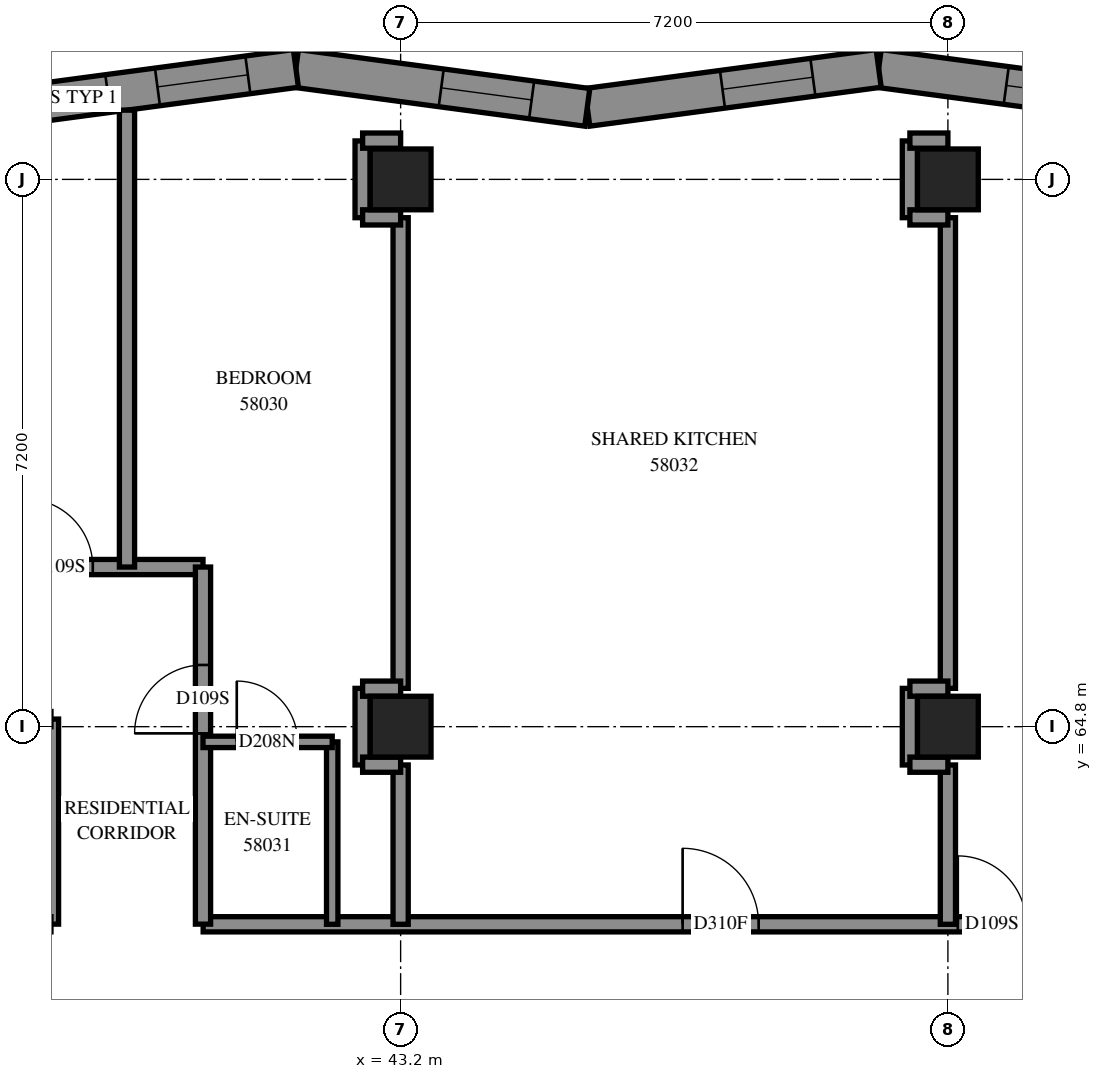
"""IFC4 building model, lengths in metres.
Left out: names, types, materials, properties, quantities, classifications, styles, units other than length and angle.
Written with IfcOpenShell. Run it as: python <this file> out.ifc"""

import sys

from ifc_helpers import new_model, si_unit, direction, frame, frame_2d, origin, origin_2d, place, context, subcontext, project, spatial, polyline, rectangle, outline, extrude, element, fill, save


model = new_model("IFC4")
c1 = context("Model", 3, precision=1e-05, world=origin(), true_north=direction((0.0, 1.0)))
c2 = subcontext(c1, "Body", "Model", "MODEL_VIEW")
j1 = project(units=[si_unit("LENGTHUNIT", "METRE"), si_unit("PLANEANGLEUNIT", "RADIAN")], contexts=[c1])
p1 = place(None, origin())
s1 = spatial("IfcSite", under=j1, at=p1, CompositionType="ELEMENT")
p2 = place(p1, origin())
s2 = spatial("IfcBuilding", under=s1, at=p2, CompositionType="ELEMENT")
p3 = place(p2, frame((0.0, 0.0, 213.4)))
s3 = spatial("IfcBuildingStorey", under=s2, at=p3, CompositionType="ELEMENT", Elevation=213.4)
for number, where, z_axis, x_axis in (
    (1, (43.2, 64.8, 0.0), (0.0, 0.0, 1.0), (1.0, 0.0, 0.0)),
    (2, (43.2, 72.0, 0.0), (0.0, 0.0, 1.0), (1.0, 0.0, 0.0)),
    (3, (50.4, 64.8, 0.0), (0.0, 0.0, 1.0), (1.0, 0.0, 0.0)),
    (4, (50.4, 72.0, 0.0), (0.0, 0.0, 1.0), (1.0, 0.0, 0.0)),
):
    element("IfcColumn", number, at=place(p3, frame(where, z_axis=z_axis, x_axis=x_axis)), inside=s3, PredefinedType="COLUMN", context=c2, shape_type="SweptSolid", body=[
        extrude(rectangle(XDim=0.8, YDim=0.8, at=origin_2d()), origin(), (0.0, 0.0, 1.0), 3.1),
    ])
p4 = place(p3, frame((53.323, 72.948, 0.0), z_axis=(0.0, 0.0, 1.0), x_axis=(-0.9911989729, 0.1323804972, 0.0)))
e5 = element("IfcWall", 5, at=p4, inside=s3, PredefinedType="SOLIDWALL", context=c2, shape_type="SweptSolid", body=[
    extrude(outline(polyline([(0.033, -0.25), (3.901, -0.25), (3.834, 0.25), (-0.033, 0.25), (0.033, -0.25)])), origin(), (0.0, 0.0, 1.0), 3.1),
])
p5 = place(p4, frame((0.974, 0.0, 0.45)))
e6 = element("IfcOpeningElement", 6, at=p5, cuts=e5, PredefinedType="OPENING", context=c2, shape_type="SweptSolid", body=[
    extrude(rectangle(XDim=1.2, YDim=2.5, at=frame_2d((0.6, 1.25))), frame((0.0, 0.26, 0.0), z_axis=(0.0, -1.0, 0.0), x_axis=(1.0, 0.0, 0.0)), (0.0, 0.0, 1.0), 0.52),
])
p6 = place(p3, frame((49.489, 73.46, 0.0), z_axis=(0.0, 0.0, 1.0), x_axis=(-0.9911985198, -0.13238389, 0.0)))
e7 = element("IfcWall", 7, at=p6, inside=s3, PredefinedType="SOLIDWALL", context=c2, shape_type="SweptSolid", body=[
    extrude(outline(polyline([(-0.033, -0.25), (3.834, -0.25), (3.901, 0.25), (0.033, 0.25), (-0.033, -0.25)])), origin(), (0.0, 0.0, 1.0), 3.1),
])
p7 = place(p6, frame((0.873, 0.0, 0.45)))
e8 = element("IfcOpeningElement", 8, at=p7, cuts=e7, PredefinedType="OPENING", context=c2, shape_type="SweptSolid", body=[
    extrude(rectangle(XDim=1.2, YDim=2.5, at=frame_2d((0.6, 1.25))), frame((0.0, 0.26, 0.0), z_axis=(0.0, -1.0, 0.0), x_axis=(1.0, 0.0, 0.0)), (0.0, 0.0, 1.0), 0.52),
])
p8 = place(p3, frame((45.656, 72.948, 0.0), z_axis=(0.0, 0.0, 1.0), x_axis=(-0.9911989729, 0.1323804972, 0.0)))
e9 = element("IfcWall", 9, at=p8, inside=s3, PredefinedType="SOLIDWALL", context=c2, shape_type="SweptSolid", body=[
    extrude(outline(polyline([(0.033, -0.25), (3.901, -0.25), (3.834, 0.25), (-0.033, 0.25), (0.033, -0.25)])), origin(), (0.0, 0.0, 1.0), 3.1),
])
p9 = place(p8, frame((0.739, 0.0, 0.45)))
e10 = element("IfcOpeningElement", 10, at=p9, cuts=e9, PredefinedType="OPENING", context=c2, shape_type="SweptSolid", body=[
    extrude(rectangle(XDim=1.2, YDim=2.5, at=frame_2d((0.6, 1.25))), frame((0.0, 0.26, 0.0), z_axis=(0.0, -1.0, 0.0), x_axis=(1.0, 0.0, 0.0)), (0.0, 0.0, 1.0), 0.52),
])
p10 = place(p3, frame((41.822, 73.46, 0.0), z_axis=(0.0, 0.0, 1.0), x_axis=(-0.9911985198, -0.13238389, 0.0)))
e11 = element("IfcWall", 11, at=p10, inside=s3, PredefinedType="SOLIDWALL", context=c2, shape_type="SweptSolid", body=[
    extrude(outline(polyline([(-0.033, -0.25), (3.834, -0.25), (3.901, 0.25), (0.033, 0.25), (-0.033, -0.25)])), origin(), (0.0, 0.0, 1.0), 3.1),
])
p11 = place(p10, frame((0.638, 0.0, 0.45)))
e12 = element("IfcOpeningElement", 12, at=p11, cuts=e11, PredefinedType="OPENING", context=c2, shape_type="SweptSolid", body=[
    extrude(rectangle(XDim=1.2, YDim=2.5, at=frame_2d((0.6, 1.25))), frame((0.0, 0.26, 0.0), z_axis=(0.0, -1.0, 0.0), x_axis=(1.0, 0.0, 0.0)), (0.0, 0.0, 1.0), 0.52),
])
p12 = place(p10, frame((2.496, 0.0, 0.45)))
e13 = element("IfcOpeningElement", 13, at=p12, cuts=e11, PredefinedType="OPENING", context=c2, shape_type="SweptSolid", body=[
    extrude(rectangle(XDim=1.0, YDim=2.5, at=frame_2d((0.5, 1.25))), frame((0.0, 0.26, 0.0), z_axis=(0.0, -1.0, 0.0), x_axis=(1.0, 0.0, 0.0)), (0.0, 0.0, 1.0), 0.52),
])
p13 = place(p3, frame((40.602, 62.2, 0.0), z_axis=(0.0, 0.0, 1.0), x_axis=(1.0, 0.0, 0.0)))
e14 = element("IfcWall", 14, at=p13, inside=s3, PredefinedType="PARTITIONING", context=c2, shape_type="SweptSolid", body=[
    extrude(rectangle(XDim=14.998, YDim=0.2, at=frame_2d((7.499, 0.0))), origin(), (0.0, 0.0, 1.0), 3.1),
])
p14 = place(p13, frame((6.308, 0.0, 0.0)))
e15 = element("IfcOpeningElement", 15, at=p14, cuts=e14, PredefinedType="OPENING", context=c2, shape_type="SweptSolid", body=[
    extrude(rectangle(XDim=1.0, YDim=2.1, at=frame_2d((0.5, 1.05))), frame((0.0, 0.11, 0.0), z_axis=(0.0, -1.0, 0.0), x_axis=(1.0, 0.0, 0.0)), (0.0, 0.0, 1.0), 0.22),
])
p15 = place(p13, frame((9.928, 0.0, 0.0)))
e16 = element("IfcOpeningElement", 16, at=p15, cuts=e14, PredefinedType="OPENING", context=c2, shape_type="SweptSolid", body=[
    extrude(rectangle(XDim=0.9, YDim=2.1, at=frame_2d((0.45, 1.05))), frame((0.0, 0.11, 0.0), z_axis=(0.0, -1.0, 0.0), x_axis=(1.0, 0.0, 0.0)), (0.0, 0.0, 1.0), 0.22),
])
p16 = place(p13, frame((13.746, 0.0, 0.0)))
e17 = element("IfcOpeningElement", 17, at=p16, cuts=e14, PredefinedType="OPENING", context=c2, shape_type="SweptSolid", body=[
    extrude(rectangle(XDim=1.0, YDim=2.1, at=frame_2d((0.5, 1.05))), frame((0.0, 0.11, 0.0), z_axis=(0.0, -1.0, 0.0), x_axis=(1.0, 0.0, 0.0)), (0.0, 0.0, 1.0), 0.22),
])
p17 = place(p3, frame((28.802, 66.9, 0.0), z_axis=(0.0, 0.0, 1.0), x_axis=(1.0, 0.0, 0.0)))
e18 = element("IfcWall", 18, at=p17, inside=s3, PredefinedType="PARTITIONING", context=c2, shape_type="SweptSolid", body=[
    extrude(rectangle(XDim=11.798, YDim=0.2, at=frame_2d((5.899, 0.0))), origin(), (0.0, 0.0, 1.0), 3.1),
])
p18 = place(p17, frame((1.805, 0.0, 0.0)))
e19 = element("IfcOpeningElement", 19, at=p18, cuts=e18, PredefinedType="OPENING", context=c2, shape_type="SweptSolid", body=[
    extrude(rectangle(XDim=1.0, YDim=2.1, at=frame_2d((0.5, 1.05))), frame((0.0, 0.11, 0.0), z_axis=(0.0, -1.0, 0.0), x_axis=(1.0, 0.0, 0.0)), (0.0, 0.0, 1.0), 0.22),
])
p19 = place(p17, frame((3.998, 0.0, 0.0)))
e20 = element("IfcOpeningElement", 20, at=p19, cuts=e18, PredefinedType="OPENING", context=c2, shape_type="SweptSolid", body=[
    extrude(rectangle(XDim=0.9, YDim=2.1, at=frame_2d((0.45, 1.05))), frame((0.0, 0.11, 0.0), z_axis=(0.0, -1.0, 0.0), x_axis=(1.0, 0.0, 0.0)), (0.0, 0.0, 1.0), 0.22),
])
p20 = place(p17, frame((9.448, 0.0, 0.0)))
e21 = element("IfcOpeningElement", 21, at=p20, cuts=e18, PredefinedType="OPENING", context=c2, shape_type="SweptSolid", body=[
    extrude(rectangle(XDim=0.9, YDim=2.1, at=frame_2d((0.45, 1.05))), frame((0.0, 0.11, 0.0), z_axis=(0.0, -1.0, 0.0), x_axis=(1.0, 0.0, 0.0)), (0.0, 0.0, 1.0), 0.22),
])
for number, where, z_axis, x_axis in (
    (22, (43.2, 65.304, 0.0), (0.0, 0.0, 1.0), (0.0, 1.0, 0.0)),
    (23, (50.4, 65.304, 0.0), (0.0, 0.0, 1.0), (0.0, 1.0, 0.0)),
):
    element("IfcWall", number, at=place(p3, frame(where, z_axis=z_axis, x_axis=x_axis)), inside=s3, PredefinedType="PARTITIONING", context=c2, shape_type="SweptSolid", body=[
        extrude(rectangle(XDim=6.192, YDim=0.2, at=frame_2d((3.096, 0.0))), origin(), (0.0, 0.0, 1.0), 3.1),
    ])
p21 = place(p3, frame((39.6, 66.9, 0.0), z_axis=(0.0, 0.0, 1.0), x_axis=(0.0, 1.0, 0.0)))
e24 = element("IfcWall", 24, at=p21, inside=s3, PredefinedType="PARTITIONING", context=c2, shape_type="SweptSolid", body=[
    extrude(rectangle(XDim=6.011, YDim=0.2, at=frame_2d((3.005, 0.0))), origin(), (0.0, 0.0, 1.0), 3.1),
])
p22 = place(p3, frame((40.6, 62.202, 0.0), z_axis=(0.0, 0.0, 1.0), x_axis=(0.0, 1.0, 0.0)))
e25 = element("IfcWall", 25, at=p22, inside=s3, PredefinedType="PARTITIONING", context=c2, shape_type="SweptSolid", body=[
    extrude(rectangle(XDim=4.698, YDim=0.2, at=frame_2d((2.349, 0.0))), origin(), (0.0, 0.0, 1.0), 3.1),
])
p23 = place(p22, frame((2.51, 0.0, 0.0)))
e26 = element("IfcOpeningElement", 26, at=p23, cuts=e25, PredefinedType="OPENING", context=c2, shape_type="SweptSolid", body=[
    extrude(rectangle(XDim=0.9, YDim=2.1, at=frame_2d((0.45, 1.05))), frame((0.0, 0.11, 0.0), z_axis=(0.0, -1.0, 0.0), x_axis=(1.0, 0.0, 0.0)), (0.0, 0.0, 1.0), 0.22),
])
p24 = place(p3, frame((38.6, 62.202, 0.0), z_axis=(0.0, 0.0, 1.0), x_axis=(0.0, 1.0, 0.0)))
e27 = element("IfcWall", 27, at=p24, inside=s3, PredefinedType="PARTITIONING", context=c2, shape_type="SweptSolid", body=[
    extrude(rectangle(XDim=2.698, YDim=0.2, at=frame_2d((1.349, 0.0))), origin(), (0.0, 0.0, 1.0), 3.1),
])
p25 = place(p3, frame((42.3, 62.2, 0.0), z_axis=(0.0, 0.0, 1.0), x_axis=(0.0, 1.0, 0.0)))
e28 = element("IfcWall", 28, at=p25, inside=s3, PredefinedType="PARTITIONING", context=c2, shape_type="SweptSolid", body=[
    extrude(rectangle(XDim=2.4, YDim=0.15, at=frame_2d((1.2, 0.0))), origin(), (0.0, 0.0, 1.0), 3.1),
])
for number, where, z_axis, x_axis in (
    (29, (43.2, 62.2, 0.0), (0.0, 0.0, 1.0), (0.0, 1.0, 0.0)),
    (30, (50.4, 62.2, 0.0), (0.0, 0.0, 1.0), (0.0, 1.0, 0.0)),
):
    element("IfcWall", number, at=place(p3, frame(where, z_axis=z_axis, x_axis=x_axis)), inside=s3, PredefinedType="PARTITIONING", context=c2, shape_type="SweptSolid", body=[
        extrude(rectangle(XDim=2.096, YDim=0.2, at=frame_2d((1.048, 0.0))), origin(), (0.0, 0.0, 1.0), 3.1),
    ])
p26 = place(p3, frame((40.6, 64.6, 0.0), z_axis=(0.0, 0.0, 1.0), x_axis=(1.0, 0.0, 0.0)))
e31 = element("IfcWall", 31, at=p26, inside=s3, PredefinedType="PARTITIONING", context=c2, shape_type="SweptSolid", body=[
    extrude(rectangle(XDim=1.7, YDim=0.15, at=frame_2d((0.85, 0.0))), origin(), (0.0, 0.0, 1.0), 3.1),
])
p27 = place(p26, frame((0.444, 0.0, 0.0)))
e32 = element("IfcOpeningElement", 32, at=p27, cuts=e31, PredefinedType="OPENING", context=c2, shape_type="SweptSolid", body=[
    extrude(rectangle(XDim=0.8, YDim=2.1, at=frame_2d((0.4, 1.05))), frame((0.0, 0.085, 0.0), z_axis=(0.0, -1.0, 0.0), x_axis=(1.0, 0.0, 0.0)), (0.0, 0.0, 1.0), 0.17),
])
for number, where, z_axis, x_axis in (
    (33, (42.7, 71.496, 0.0), (0.0, 0.0, 1.0), (0.0, 1.0, 0.0)),
    (34, (49.9, 71.496, 0.0), (0.0, 0.0, 1.0), (0.0, 1.0, 0.0)),
):
    element("IfcWall", number, at=place(p3, frame(where, z_axis=z_axis, x_axis=x_axis)), inside=s3, PredefinedType="PARTITIONING", context=c2, shape_type="SweptSolid", body=[
        extrude(rectangle(XDim=1.01, YDim=0.2, at=frame_2d((0.505, 0.0))), origin(), (0.0, 0.0, 1.0), 3.1),
    ])
for number, where, z_axis, x_axis in (
    (35, (42.7, 64.296, 0.0), (0.0, 0.0, 1.0), (0.0, 1.0, 0.0)),
    (36, (49.9, 64.296, 0.0), (0.0, 0.0, 1.0), (0.0, 1.0, 0.0)),
):
    element("IfcWall", number, at=place(p3, frame(where, z_axis=z_axis, x_axis=x_axis)), inside=s3, PredefinedType="PARTITIONING", context=c2, shape_type="SweptSolid", body=[
        extrude(rectangle(XDim=1.008, YDim=0.2, at=frame_2d((0.504, 0.0))), origin(), (0.0, 0.0, 1.0), 3.1),
    ])
for number, where, z_axis, x_axis in (
    (37, (42.7, 72.51, 0.0), (0.0, 0.0, 1.0), (1.0, 0.0, 0.0)),
    (38, (49.9, 72.51, 0.0), (0.0, 0.0, 1.0), (1.0, 0.0, 0.0)),
    (39, (42.7, 71.5, 0.0), (0.0, 0.0, 1.0), (1.0, 0.0, 0.0)),
    (40, (49.9, 71.5, 0.0), (0.0, 0.0, 1.0), (1.0, 0.0, 0.0)),
    (41, (42.7, 65.3, 0.0), (0.0, 0.0, 1.0), (1.0, 0.0, 0.0)),
    (42, (49.9, 65.3, 0.0), (0.0, 0.0, 1.0), (1.0, 0.0, 0.0)),
    (43, (42.7, 64.3, 0.0), (0.0, 0.0, 1.0), (1.0, 0.0, 0.0)),
    (44, (49.9, 64.3, 0.0), (0.0, 0.0, 1.0), (1.0, 0.0, 0.0)),
):
    element("IfcWall", number, at=place(p3, frame(where, z_axis=z_axis, x_axis=x_axis)), inside=s3, PredefinedType="PARTITIONING", context=c2, shape_type="SweptSolid", body=[
        extrude(rectangle(XDim=0.5, YDim=0.2, at=frame_2d((0.25, 0.0))), origin(), (0.0, 0.0, 1.0), 3.1),
    ])
p28 = place(p5, origin())
e45 = element("IfcWindow", 45, at=p28, inside=s3, PartitioningType="SINGLE_PANEL", PredefinedType="WINDOW", context=c2, shape_type="SweptSolid", body=[
    extrude(rectangle(XDim=1.2, YDim=2.5, at=frame_2d((0.6, 1.25))), frame((0.0, 0.18, 0.0), z_axis=(0.0, -1.0, 0.0), x_axis=(1.0, 0.0, 0.0)), (0.0, 0.0, 1.0), 0.06),
])
fill(e6, e45)
p29 = place(p7, origin())
e46 = element("IfcWindow", 46, at=p29, inside=s3, PartitioningType="SINGLE_PANEL", PredefinedType="WINDOW", context=c2, shape_type="SweptSolid", body=[
    extrude(rectangle(XDim=1.2, YDim=2.5, at=frame_2d((0.6, 1.25))), frame((0.0, 0.18, 0.0), z_axis=(0.0, -1.0, 0.0), x_axis=(1.0, 0.0, 0.0)), (0.0, 0.0, 1.0), 0.06),
])
fill(e8, e46)
p30 = place(p9, origin())
e47 = element("IfcWindow", 47, at=p30, inside=s3, PartitioningType="SINGLE_PANEL", PredefinedType="WINDOW", context=c2, shape_type="SweptSolid", body=[
    extrude(rectangle(XDim=1.2, YDim=2.5, at=frame_2d((0.6, 1.25))), frame((0.0, 0.18, 0.0), z_axis=(0.0, -1.0, 0.0), x_axis=(1.0, 0.0, 0.0)), (0.0, 0.0, 1.0), 0.06),
])
fill(e10, e47)
p31 = place(p11, origin())
e48 = element("IfcWindow", 48, at=p31, inside=s3, PartitioningType="SINGLE_PANEL", PredefinedType="WINDOW", context=c2, shape_type="SweptSolid", body=[
    extrude(rectangle(XDim=1.2, YDim=2.5, at=frame_2d((0.6, 1.25))), frame((0.0, 0.18, 0.0), z_axis=(0.0, -1.0, 0.0), x_axis=(1.0, 0.0, 0.0)), (0.0, 0.0, 1.0), 0.06),
])
fill(e12, e48)
p32 = place(p20, origin())
e49 = element("IfcDoor", 49, at=p32, inside=s3, OperationType="SINGLE_SWING_RIGHT", PredefinedType="DOOR", context=c2, shape_type="SweptSolid", body=[
    extrude(rectangle(XDim=0.9, YDim=2.1, at=frame_2d((0.45, 1.05))), frame((0.0, 0.025, 0.0), z_axis=(0.0, -1.0, 0.0), x_axis=(1.0, 0.0, 0.0)), (0.0, 0.0, 1.0), 0.05),
])
fill(e21, e49)
p33 = place(p23, origin())
e50 = element("IfcDoor", 50, at=p33, inside=s3, OperationType="SINGLE_SWING_LEFT", PredefinedType="DOOR", context=c2, shape_type="SweptSolid", body=[
    extrude(rectangle(XDim=0.9, YDim=2.1, at=frame_2d((0.45, 1.05))), frame((0.0, 0.025, 0.0), z_axis=(0.0, -1.0, 0.0), x_axis=(1.0, 0.0, 0.0)), (0.0, 0.0, 1.0), 0.05),
])
fill(e26, e50)
p34 = place(p27, origin())
e51 = element("IfcDoor", 51, at=p34, inside=s3, OperationType="SINGLE_SWING_RIGHT", PredefinedType="DOOR", context=c2, shape_type="SweptSolid", body=[
    extrude(rectangle(XDim=0.8, YDim=2.1, at=frame_2d((0.4, 1.05))), frame((0.0, 0.025, 0.0), z_axis=(0.0, -1.0, 0.0), x_axis=(1.0, 0.0, 0.0)), (0.0, 0.0, 1.0), 0.05),
])
fill(e32, e51)
p35 = place(p14, origin())
e52 = element("IfcDoor", 52, at=p35, inside=s3, OperationType="SINGLE_SWING_RIGHT", PredefinedType="DOOR", context=c2, shape_type="SweptSolid", body=[
    extrude(rectangle(XDim=1.0, YDim=2.1, at=frame_2d((0.5, 1.05))), frame((0.0, 0.025, 0.0), z_axis=(0.0, -1.0, 0.0), x_axis=(1.0, 0.0, 0.0)), (0.0, 0.0, 1.0), 0.05),
])
fill(e15, e52)
p36 = place(p15, origin())
e53 = element("IfcDoor", 53, at=p36, inside=s3, OperationType="SINGLE_SWING_RIGHT", PredefinedType="DOOR", context=c2, shape_type="SweptSolid", body=[
    extrude(rectangle(XDim=0.9, YDim=2.1, at=frame_2d((0.45, 1.05))), frame((0.0, 0.025, 0.0), z_axis=(0.0, -1.0, 0.0), x_axis=(1.0, 0.0, 0.0)), (0.0, 0.0, 1.0), 0.05),
])
fill(e16, e53)
p37 = place(p12, origin())
e54 = element("IfcWindow", 54, at=p37, inside=s3, PartitioningType="SINGLE_PANEL", PredefinedType="WINDOW", context=c2, shape_type="SweptSolid", body=[
    extrude(rectangle(XDim=1.0, YDim=2.5, at=frame_2d((0.5, 1.25))), frame((0.0, 0.18, 0.0), z_axis=(0.0, -1.0, 0.0), x_axis=(1.0, 0.0, 0.0)), (0.0, 0.0, 1.0), 0.06),
])
fill(e13, e54)
save(model, sys.argv[1])
